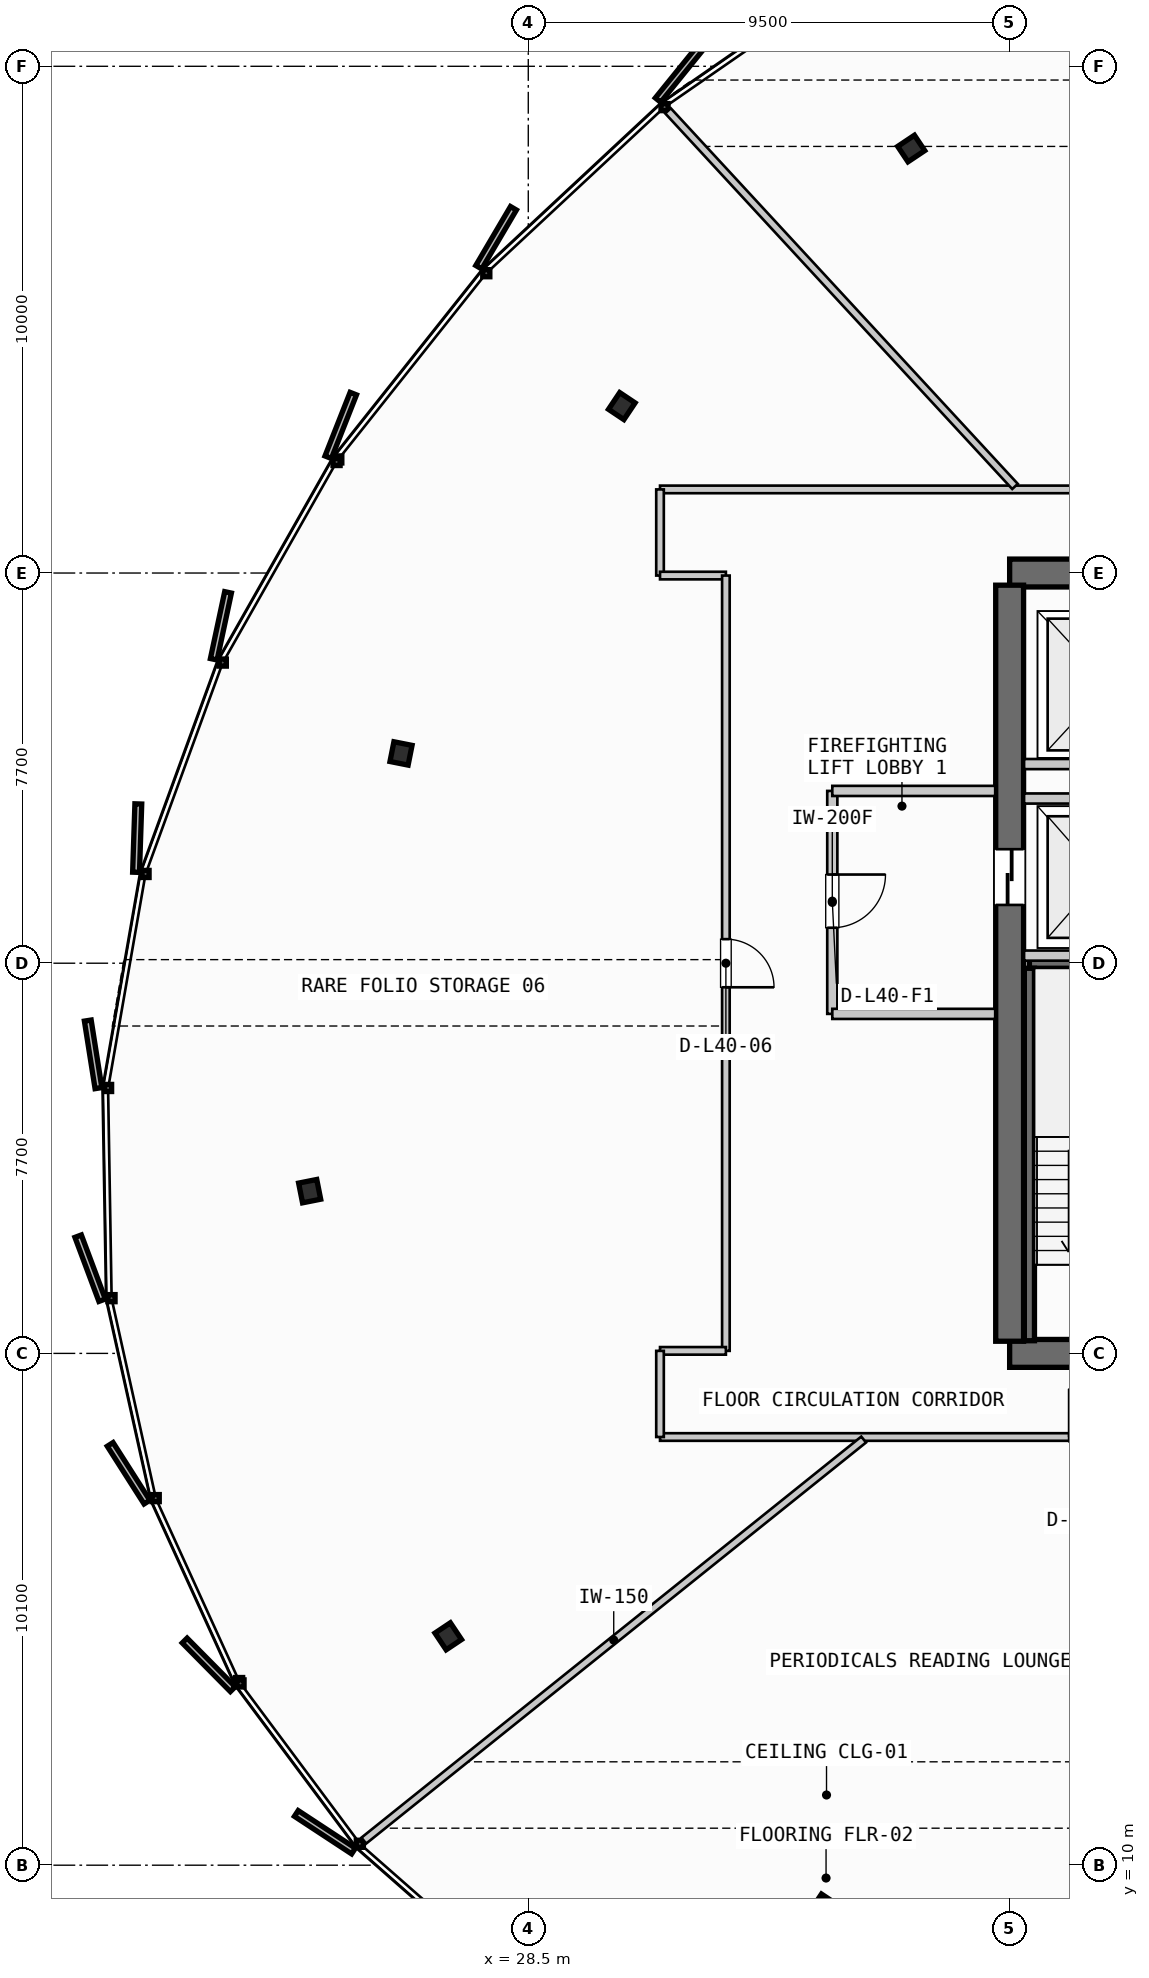
"""IFC4 building model, lengths in metres.
Left out: names, types, materials, properties, quantities, classifications, styles, units other than length and angle.
Written with IfcOpenShell. Run it as: python <this file> out.ifc"""

import sys

from ifc_helpers import new_model, si_unit, direction, frame, frame_2d, origin, origin_2d, place, context, subcontext, project, spatial, rectangle, i_section, extrude, source, transform, mapped, element, fill, save


model = new_model("IFC4")
c1 = context("Model", 3, precision=1e-05, world=origin(), true_north=direction((0.0, 1.0)))
c2 = subcontext(c1, "Body", "Model", "MODEL_VIEW")
j1 = project(units=[si_unit("LENGTHUNIT", "METRE"), si_unit("PLANEANGLEUNIT", "RADIAN")], contexts=[c1])
p1 = place(None, origin())
s1 = spatial("IfcSite", under=j1, at=p1, CompositionType="ELEMENT")
p2 = place(p1, origin())
s2 = spatial("IfcBuilding", under=s1, at=p2, CompositionType="ELEMENT")
p3 = place(p2, frame((0.0, 0.0, 157.2)))
s3 = spatial("IfcBuildingStorey", under=s2, at=p3, CompositionType="ELEMENT", Elevation=157.2)
p4 = place(p3, frame((38.0, 20.1, 0.0), z_axis=(0.0, 0.0, 1.0), x_axis=(1.0, 0.0, 0.0)))
e1 = element("IfcWall", 1, at=p4, inside=s3, PredefinedType="SHEAR", context=c2, shape_type="SweptSolid", body=[
    extrude(rectangle(XDim=17.6, YDim=0.55, at=frame_2d((8.8, 0.0))), origin(), (0.0, 0.0, 1.0), 3.3),
])
p5 = place(p4, frame((1.4, 0.0, 0.0)))
e2 = element("IfcOpeningElement", 2, at=p5, cuts=e1, PredefinedType="OPENING", context=c2, shape_type="SweptSolid", body=[
    extrude(rectangle(XDim=1.05, YDim=2.15, at=frame_2d((0.525, 1.075))), frame((0.0, 0.285, 0.0), z_axis=(0.0, -1.0, 0.0), x_axis=(1.0, 0.0, 0.0)), (0.0, 0.0, 1.0), 0.57),
])
p6 = place(p4, frame((15.15, 0.0, 0.0)))
e3 = element("IfcOpeningElement", 3, at=p6, cuts=e1, PredefinedType="OPENING", context=c2, shape_type="SweptSolid", body=[
    extrude(rectangle(XDim=1.05, YDim=2.15, at=frame_2d((0.525, 1.075))), frame((0.0, 0.285, 0.0), z_axis=(0.0, -1.0, 0.0), x_axis=(1.0, 0.0, 0.0)), (0.0, 0.0, 1.0), 0.57),
])
p7 = place(p4, frame((5.25, 0.0, 0.0)))
e4 = element("IfcOpeningElement", 4, at=p7, cuts=e1, PredefinedType="OPENING", context=c2, shape_type="SweptSolid", body=[
    extrude(rectangle(XDim=0.95, YDim=2.15, at=frame_2d((0.475, 1.075))), frame((0.0, 0.285, 0.0), z_axis=(0.0, -1.0, 0.0), x_axis=(1.0, 0.0, 0.0)), (0.0, 0.0, 1.0), 0.57),
])
p8 = place(p4, frame((11.4, 0.0, 0.0)))
e5 = element("IfcOpeningElement", 5, at=p8, cuts=e1, PredefinedType="OPENING", context=c2, shape_type="SweptSolid", body=[
    extrude(rectangle(XDim=0.95, YDim=2.15, at=frame_2d((0.475, 1.075))), frame((0.0, 0.285, 0.0), z_axis=(0.0, -1.0, 0.0), x_axis=(1.0, 0.0, 0.0)), (0.0, 0.0, 1.0), 0.57),
])
p9 = place(p3, frame((55.6, 35.5, 0.0), z_axis=(0.0, 0.0, 1.0), x_axis=(-1.0, 0.0, 0.0)))
e6 = element("IfcWall", 6, at=p9, inside=s3, PredefinedType="SHEAR", context=c2, shape_type="SweptSolid", body=[
    extrude(rectangle(XDim=17.6, YDim=0.55, at=frame_2d((8.8, 0.0))), origin(), (0.0, 0.0, 1.0), 3.3),
])
p10 = place(p9, frame((8.05, 0.0, 0.0)))
e7 = element("IfcOpeningElement", 7, at=p10, cuts=e6, PredefinedType="OPENING", context=c2, shape_type="SweptSolid", body=[
    extrude(rectangle(XDim=1.5, YDim=2.2, at=frame_2d((0.75, 1.1))), frame((0.0, 0.285, 0.0), z_axis=(0.0, -1.0, 0.0), x_axis=(1.0, 0.0, 0.0)), (0.0, 0.0, 1.0), 0.57),
])
p11 = place(p9, frame((14.95, 0.0, 0.0)))
e8 = element("IfcOpeningElement", 8, at=p11, cuts=e6, PredefinedType="OPENING", context=c2, shape_type="SweptSolid", body=[
    extrude(rectangle(XDim=1.4, YDim=2.3, at=frame_2d((0.7, 1.15))), frame((0.0, 0.285, 0.0), z_axis=(0.0, -1.0, 0.0), x_axis=(1.0, 0.0, 0.0)), (0.0, 0.0, 1.0), 0.57),
])
p12 = place(p9, frame((12.6, 0.0, 0.0)))
e9 = element("IfcOpeningElement", 9, at=p12, cuts=e6, PredefinedType="OPENING", context=c2, shape_type="SweptSolid", body=[
    extrude(rectangle(XDim=0.95, YDim=2.15, at=frame_2d((0.475, 1.075))), frame((0.0, 0.285, 0.0), z_axis=(0.0, -1.0, 0.0), x_axis=(1.0, 0.0, 0.0)), (0.0, 0.0, 1.0), 0.57),
])
p13 = place(p9, frame((10.45, 0.0, 0.0)))
e10 = element("IfcOpeningElement", 10, at=p13, cuts=e6, PredefinedType="OPENING", context=c2, shape_type="SweptSolid", body=[
    extrude(rectangle(XDim=0.95, YDim=2.15, at=frame_2d((0.475, 1.075))), frame((0.0, 0.285, 0.0), z_axis=(0.0, -1.0, 0.0), x_axis=(1.0, 0.0, 0.0)), (0.0, 0.0, 1.0), 0.57),
])
p14 = place(p3, frame((38.0, 35.26, 0.0), z_axis=(0.0, 0.0, 1.0), x_axis=(0.0, -1.0, 0.0)))
e11 = element("IfcWall", 11, at=p14, inside=s3, PredefinedType="SHEAR", context=c2, shape_type="SweptSolid", body=[
    extrude(rectangle(XDim=14.92, YDim=0.55, at=frame_2d((7.46, 0.0))), origin(), (0.0, 0.0, 1.0), 3.3),
])
p15 = place(p14, frame((5.21, 0.0, 0.0)))
e12 = element("IfcOpeningElement", 12, at=p15, cuts=e11, PredefinedType="OPENING", context=c2, shape_type="SweptSolid", body=[
    extrude(rectangle(XDim=1.1, YDim=2.2, at=frame_2d((0.55, 1.1))), frame((0.0, 0.285, 0.0), z_axis=(0.0, -1.0, 0.0), x_axis=(1.0, 0.0, 0.0)), (0.0, 0.0, 1.0), 0.57),
])
m1 = source(origin(), c2, "Body", "SweptSolid", [
    extrude(i_section(OverallWidth=0.397, OverallDepth=0.365, WebThickness=0.028, FlangeThickness=0.044, FilletRadius=0.015, at=origin_2d()), origin(), (0.0, 0.0, 1.0), 3.3),
])
for number, where, z_axis, x_axis in (
    (13, (36.058, 43.877, 0.0), (0.0, 0.0, 1.0), (-0.556, 0.831, 0.0)),
    (14, (30.346, 38.794, 0.0), (0.0, 0.0, 1.0), (-0.831, 0.556, 0.0)),
    (15, (25.989, 31.94, 0.0), (0.0, 0.0, 1.0), (-0.981, 0.195, 0.0)),
    (16, (24.185, 23.302, 0.0), (0.0, 0.0, 1.0), (-0.981, -0.195, 0.0)),
    (17, (26.921, 14.517, 0.0), (0.0, 0.0, 1.0), (-0.831, -0.556, 0.0)),
    (18, (34.351, 9.168, 0.0), (0.0, 0.0, 1.0), (-0.556, -0.831, 0.0)),
):
    element("IfcColumn", number, at=place(p3, frame(where, z_axis=z_axis, x_axis=x_axis)), inside=s3, PredefinedType="COLUMN", context=c2, shape_type="MappedRepresentation", body=[
        mapped(m1, transform((0.0, 0.0, 0.0), scale=1.0)),
    ])
p16 = place(p3, frame((38.39, 27.8, 0.0), z_axis=(0.0, 0.0, 1.0), x_axis=(1.0, 0.0, 0.0)))
e19 = element("IfcWall", 19, at=p16, inside=s3, PredefinedType="SHEAR", context=c2, shape_type="SweptSolid", body=[
    extrude(rectangle(XDim=3.06, YDim=0.2, at=frame_2d((1.53, 0.0))), origin(), (0.0, 0.0, 1.0), 3.3),
])
p17 = place(p3, frame((38.39, 20.35, 0.0), z_axis=(0.0, 0.0, 1.0), x_axis=(0.0, 1.0, 0.0)))
e20 = element("IfcWall", 20, at=p17, inside=s3, PredefinedType="SHEAR", context=c2, shape_type="SweptSolid", body=[
    extrude(rectangle(XDim=7.35, YDim=0.2, at=frame_2d((3.675, 0.0))), origin(), (0.0, 0.0, 1.0), 3.3),
])
for number, where, z_axis, x_axis in (
    (21, (38.285, 27.95, 0.0), (0.0, 0.0, 1.0), (1.0, 0.0, 0.0)),
    (22, (38.285, 31.05, 0.0), (0.0, 0.0, 1.0), (1.0, 0.0, 0.0)),
):
    element("IfcWall", number, at=place(p3, frame(where, z_axis=z_axis, x_axis=x_axis)), inside=s3, PredefinedType="PARTITIONING", context=c2, shape_type="SweptSolid", body=[
        extrude(rectangle(XDim=2.865, YDim=0.2, at=frame_2d((1.433, 0.0))), origin(), (0.0, 0.0, 1.0), 2.28),
    ])
p18 = place(p3, frame((34.5, 31.2, 0.0), z_axis=(0.0, 0.0, 1.0), x_axis=(0.0, -1.0, 0.0)))
e23 = element("IfcWall", 23, at=p18, inside=s3, PredefinedType="PARTITIONING", context=c2, shape_type="SweptSolid", body=[
    extrude(rectangle(XDim=4.4, YDim=0.2, at=frame_2d((2.2, 0.0))), origin(), (0.0, 0.0, 1.0), 2.28),
])
p19 = place(p18, frame((1.65, 0.0, 0.0)))
e24 = element("IfcOpeningElement", 24, at=p19, cuts=e23, PredefinedType="OPENING", context=c2, shape_type="SweptSolid", body=[
    extrude(rectangle(XDim=1.05, YDim=2.15, at=frame_2d((0.525, 1.075))), frame((0.0, 0.11, 0.0), z_axis=(0.0, -1.0, 0.0), x_axis=(1.0, 0.0, 0.0)), (0.0, 0.0, 1.0), 0.22),
])
for number, where, z_axis, x_axis in (
    (25, (34.5, 26.8, 0.0), (0.0, 0.0, 1.0), (1.0, 0.0, 0.0)),
    (26, (34.5, 31.2, 0.0), (0.0, 0.0, 1.0), (1.0, 0.0, 0.0)),
):
    element("IfcWall", number, at=place(p3, frame(where, z_axis=z_axis, x_axis=x_axis)), inside=s3, PredefinedType="PARTITIONING", context=c2, shape_type="SweptSolid", body=[
        extrude(rectangle(XDim=3.215, YDim=0.2, at=frame_2d((1.607, 0.0))), origin(), (0.0, 0.0, 1.0), 2.28),
    ])
p20 = place(p3, frame((38.285, 31.73, 0.0), z_axis=(0.0, 0.0, 1.0), x_axis=(1.0, 0.0, 0.0)))
e27 = element("IfcWall", 27, at=p20, inside=s3, PredefinedType="PARTITIONING", context=c2, shape_type="SweptSolid", body=[
    extrude(rectangle(XDim=7.515, YDim=0.2, at=frame_2d((3.758, 0.0))), origin(), (0.0, 0.0, 1.0), 2.28),
])
p21 = place(p3, frame((31.1, 18.45, 0.0), z_axis=(0.0, 0.0, 1.0), x_axis=(1.0, 0.0, 0.0)))
e28 = element("IfcWall", 28, at=p21, inside=s3, PredefinedType="PARTITIONING", context=c2, shape_type="SweptSolid", body=[
    extrude(rectangle(XDim=31.4, YDim=0.15, at=frame_2d((15.7, 0.0))), origin(), (0.0, 0.0, 1.0), 2.28),
])
p22 = place(p21, frame((8.074, 0.0, 0.0)))
e29 = element("IfcOpeningElement", 29, at=p22, cuts=e28, PredefinedType="OPENING", context=c2, shape_type="SweptSolid", body=[
    extrude(rectangle(XDim=0.95, YDim=2.15, at=frame_2d((0.475, 1.075))), frame((0.0, 0.085, 0.0), z_axis=(0.0, -1.0, 0.0), x_axis=(1.0, 0.0, 0.0)), (0.0, 0.0, 1.0), 0.17),
])
p23 = place(p21, frame((18.351, 0.0, 0.0)))
e30 = element("IfcOpeningElement", 30, at=p23, cuts=e28, PredefinedType="OPENING", context=c2, shape_type="SweptSolid", body=[
    extrude(rectangle(XDim=0.95, YDim=2.15, at=frame_2d((0.475, 1.075))), frame((0.0, 0.085, 0.0), z_axis=(0.0, -1.0, 0.0), x_axis=(1.0, 0.0, 0.0)), (0.0, 0.0, 1.0), 0.17),
])
p24 = place(p3, frame((62.5, 37.15, 0.0), z_axis=(0.0, 0.0, 1.0), x_axis=(-1.0, 0.0, 0.0)))
e31 = element("IfcWall", 31, at=p24, inside=s3, PredefinedType="PARTITIONING", context=c2, shape_type="SweptSolid", body=[
    extrude(rectangle(XDim=31.4, YDim=0.15, at=frame_2d((15.7, 0.0))), origin(), (0.0, 0.0, 1.0), 2.28),
])
p25 = place(p24, frame((7.678, 0.0, 0.0)))
e32 = element("IfcOpeningElement", 32, at=p25, cuts=e31, PredefinedType="OPENING", context=c2, shape_type="SweptSolid", body=[
    extrude(rectangle(XDim=0.95, YDim=2.15, at=frame_2d((0.475, 1.075))), frame((0.0, 0.085, 0.0), z_axis=(0.0, -1.0, 0.0), x_axis=(1.0, 0.0, 0.0)), (0.0, 0.0, 1.0), 0.17),
])
p26 = place(p24, frame((18.151, 0.0, 0.0)))
e33 = element("IfcOpeningElement", 33, at=p26, cuts=e31, PredefinedType="OPENING", context=c2, shape_type="SweptSolid", body=[
    extrude(rectangle(XDim=0.95, YDim=2.15, at=frame_2d((0.475, 1.075))), frame((0.0, 0.085, 0.0), z_axis=(0.0, -1.0, 0.0), x_axis=(1.0, 0.0, 0.0)), (0.0, 0.0, 1.0), 0.17),
])
p27 = place(p3, frame((31.1, 37.15, 0.0), z_axis=(0.0, 0.0, 1.0), x_axis=(0.0, -1.0, 0.0)))
e34 = element("IfcWall", 34, at=p27, inside=s3, PredefinedType="PARTITIONING", context=c2, shape_type="SweptSolid", body=[
    extrude(rectangle(XDim=1.7, YDim=0.15, at=frame_2d((0.85, 0.0))), origin(), (0.0, 0.0, 1.0), 2.28),
])
p28 = place(p3, frame((31.1, 35.45, 0.0), z_axis=(0.0, 0.0, 1.0), x_axis=(1.0, 0.0, 0.0)))
e35 = element("IfcWall", 35, at=p28, inside=s3, PredefinedType="PARTITIONING", context=c2, shape_type="SweptSolid", body=[
    extrude(rectangle(XDim=1.3, YDim=0.15, at=frame_2d((0.65, 0.0))), origin(), (0.0, 0.0, 1.0), 2.28),
])
p29 = place(p3, frame((32.4, 35.45, 0.0), z_axis=(0.0, 0.0, 1.0), x_axis=(0.0, -1.0, 0.0)))
e36 = element("IfcWall", 36, at=p29, inside=s3, PredefinedType="PARTITIONING", context=c2, shape_type="SweptSolid", body=[
    extrude(rectangle(XDim=15.3, YDim=0.15, at=frame_2d((7.65, 0.0))), origin(), (0.0, 0.0, 1.0), 2.28),
])
p30 = place(p29, frame((7.175, 0.0, 0.0)))
e37 = element("IfcOpeningElement", 37, at=p30, cuts=e36, PredefinedType="OPENING", context=c2, shape_type="SweptSolid", body=[
    extrude(rectangle(XDim=0.95, YDim=2.15, at=frame_2d((0.475, 1.075))), frame((0.0, 0.085, 0.0), z_axis=(0.0, -1.0, 0.0), x_axis=(1.0, 0.0, 0.0)), (0.0, 0.0, 1.0), 0.17),
])
p31 = place(p3, frame((32.4, 20.15, 0.0), z_axis=(0.0, 0.0, 1.0), x_axis=(-1.0, 0.0, 0.0)))
e38 = element("IfcWall", 38, at=p31, inside=s3, PredefinedType="PARTITIONING", context=c2, shape_type="SweptSolid", body=[
    extrude(rectangle(XDim=1.3, YDim=0.15, at=frame_2d((0.65, 0.0))), origin(), (0.0, 0.0, 1.0), 2.28),
])
p32 = place(p3, frame((31.1, 20.15, 0.0), z_axis=(0.0, 0.0, 1.0), x_axis=(0.0, -1.0, 0.0)))
e39 = element("IfcWall", 39, at=p32, inside=s3, PredefinedType="PARTITIONING", context=c2, shape_type="SweptSolid", body=[
    extrude(rectangle(XDim=1.7, YDim=0.15, at=frame_2d((0.85, 0.0))), origin(), (0.0, 0.0, 1.0), 2.28),
])
p33 = place(p3, frame((35.119, 18.4, 0.0), z_axis=(0.0, 0.0, 1.0), x_axis=(-0.779988558274, -0.625793775106, 0.0)))
e40 = element("IfcWall", 40, at=p33, inside=s3, PredefinedType="PARTITIONING", context=c2, shape_type="SweptSolid", body=[
    extrude(rectangle(XDim=12.648, YDim=0.15, at=frame_2d((6.324, 0.0))), origin(), (0.0, 0.0, 1.0), 2.28),
])
p34 = place(p3, frame((38.106, 37.209, 0.0), z_axis=(0.0, 0.0, 1.0), x_axis=(-0.678612616673, 0.734496369285, 0.0)))
e41 = element("IfcWall", 41, at=p34, inside=s3, PredefinedType="PARTITIONING", context=c2, shape_type="SweptSolid", body=[
    extrude(rectangle(XDim=10.092, YDim=0.15, at=frame_2d((5.046, 0.0))), origin(), (0.0, 0.0, 1.0), 2.28),
])
m2 = source(origin(), c2, "Body", "SweptSolid", [
    extrude(rectangle(XDim=1.1, YDim=2.2, at=frame_2d((0.55, 1.1))), frame((0.0, 0.025, 0.0), z_axis=(0.0, -1.0, 0.0), x_axis=(1.0, 0.0, 0.0)), (0.0, 0.0, 1.0), 0.05),
])
p35 = place(p15, origin())
e42 = element("IfcDoor", 42, at=p35, inside=s3, OperationType="SLIDING_TO_LEFT", PredefinedType="DOOR", context=c2, shape_type="MappedRepresentation", body=[
    mapped(m2, transform((0.0, 0.0, 0.0), scale=1.0)),
])
fill(e12, e42)
m3 = source(origin(), c2, "Body", "SweptSolid", [
    extrude(rectangle(XDim=1.05, YDim=2.15, at=frame_2d((0.525, 1.075))), frame((0.0, 0.025, 0.0), z_axis=(0.0, -1.0, 0.0), x_axis=(1.0, 0.0, 0.0)), (0.0, 0.0, 1.0), 0.05),
])
p36 = place(p19, origin())
e43 = element("IfcDoor", 43, at=p36, inside=s3, OperationType="SINGLE_SWING_LEFT", PredefinedType="DOOR", context=c2, shape_type="MappedRepresentation", body=[
    mapped(m3, transform((0.0, 0.0, 0.0), scale=1.0)),
])
fill(e24, e43)
m4 = source(origin(), c2, "Body", "SweptSolid", [
    extrude(rectangle(XDim=0.95, YDim=2.15, at=frame_2d((0.475, 1.075))), frame((0.0, 0.025, 0.0), z_axis=(0.0, -1.0, 0.0), x_axis=(1.0, 0.0, 0.0)), (0.0, 0.0, 1.0), 0.05),
])
p37 = place(p30, origin())
e44 = element("IfcDoor", 44, at=p37, inside=s3, OperationType="SINGLE_SWING_RIGHT", PredefinedType="DOOR", context=c2, shape_type="MappedRepresentation", body=[
    mapped(m4, transform((0.0, 0.0, 0.0), scale=1.0)),
])
fill(e37, e44)
save(model, sys.argv[1])
